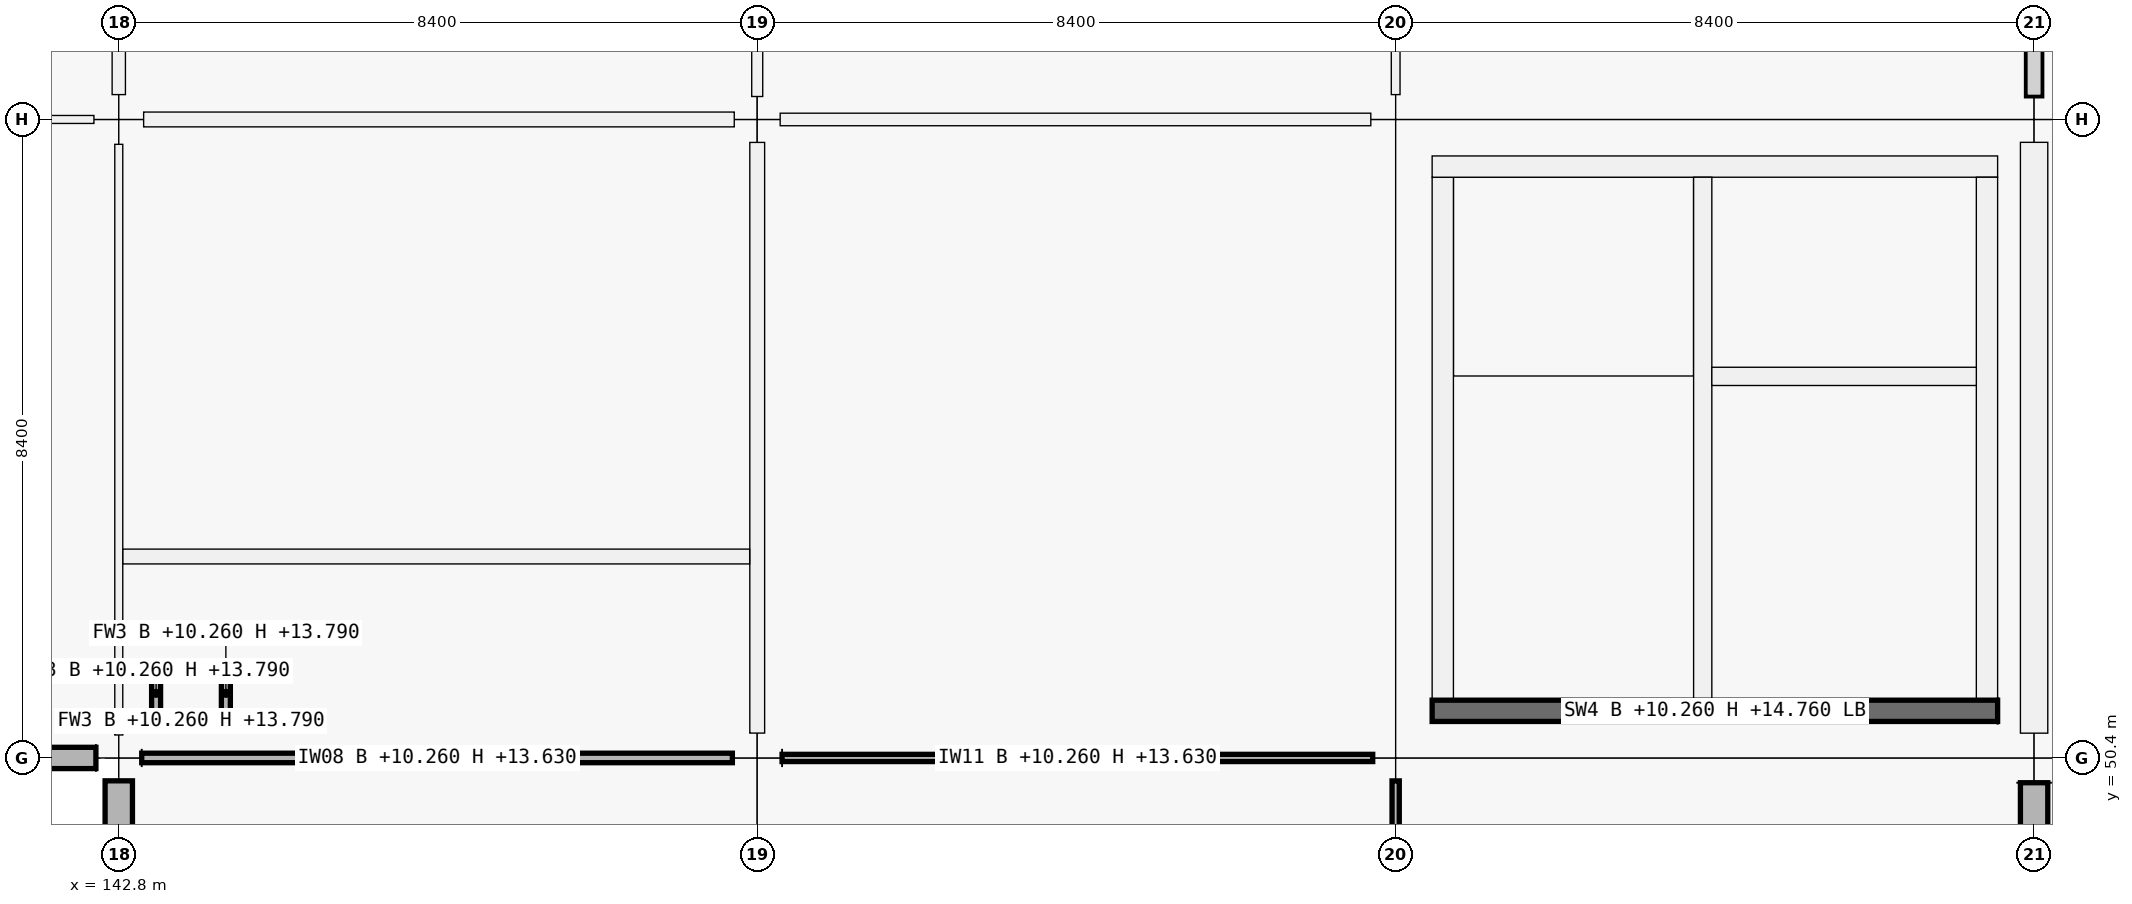
"""IFC4 building model, lengths in metres.
Left out: names, types, materials, properties, quantities, classifications, styles, units other than length and angle.
Written with IfcOpenShell. Run it as: python <this file> out.ifc"""

import sys

from ifc_helpers import new_model, si_unit, direction, frame, frame_2d, origin, origin_2d, place, context, subcontext, project, spatial, rectangle, extrude, element, fill, save


model = new_model("IFC4")
c1 = context("Model", 3, precision=1e-05, world=origin(), true_north=direction((0.0, 1.0)))
c2 = subcontext(c1, "Body", "Model", "MODEL_VIEW")
j1 = project(units=[si_unit("LENGTHUNIT", "METRE"), si_unit("PLANEANGLEUNIT", "RADIAN")], contexts=[c1])
p1 = place(None, origin())
s1 = spatial("IfcSite", under=j1, at=p1, CompositionType="ELEMENT")
p2 = place(p1, origin())
s2 = spatial("IfcBuilding", under=s1, at=p2, CompositionType="ELEMENT")
p3 = place(p2, frame((0.0, 0.0, 10.26)))
s3 = spatial("IfcBuildingStorey", under=s2, at=p3, CompositionType="ELEMENT", Elevation=10.26)
p4 = place(p3, frame((142.8, 50.4, 0.0), z_axis=(0.0, 0.0, 1.0), x_axis=(1.0, 0.0, 0.0)))
e1 = element("IfcColumn", 1, at=p4, inside=s3, PredefinedType="COLUMN", context=c2, shape_type="SweptSolid", body=[
    extrude(rectangle(XDim=0.6, YDim=0.6, at=origin_2d()), origin(), (0.0, 0.0, 1.0), 4.5),
])
for number, where, z_axis, x_axis in (
    (2, (142.8, 58.8, 0.0), (0.0, 0.0, 1.0), (1.0, 0.0, 0.0)),
    (3, (151.2, 50.4, 0.0), (0.0, 0.0, 1.0), (1.0, 0.0, 0.0)),
):
    element("IfcColumn", number, at=place(p3, frame(where, z_axis=z_axis, x_axis=x_axis)), inside=s3, PredefinedType="COLUMN", context=c2, shape_type="SweptSolid", body=[
        extrude(rectangle(XDim=0.65, YDim=0.65, at=origin_2d()), origin(), (0.0, 0.0, 1.0), 4.5),
    ])
for number, where, z_axis, x_axis in (
    (4, (151.2, 58.8, 0.0), (0.0, 0.0, 1.0), (1.0, 0.0, 0.0)),
    (5, (159.6, 50.4, 0.0), (0.0, 0.0, 1.0), (1.0, 0.0, 0.0)),
):
    element("IfcColumn", number, at=place(p3, frame(where, z_axis=z_axis, x_axis=x_axis)), inside=s3, PredefinedType="COLUMN", context=c2, shape_type="SweptSolid", body=[
        extrude(rectangle(XDim=0.6, YDim=0.6, at=origin_2d()), origin(), (0.0, 0.0, 1.0), 4.5),
    ])
for number, where, z_axis, x_axis in (
    (6, (159.6, 58.8, 0.0), (0.0, 0.0, 1.0), (1.0, 0.0, 0.0)),
    (7, (168.0, 50.4, 0.0), (0.0, 0.0, 1.0), (1.0, 0.0, 0.0)),
):
    element("IfcColumn", number, at=place(p3, frame(where, z_axis=z_axis, x_axis=x_axis)), inside=s3, PredefinedType="COLUMN", context=c2, shape_type="SweptSolid", body=[
        extrude(rectangle(XDim=0.65, YDim=0.65, at=origin_2d()), origin(), (0.0, 0.0, 1.0), 4.5),
    ])
p5 = place(p3, frame((168.0, 58.8, 0.0), z_axis=(0.0, 0.0, 1.0), x_axis=(1.0, 0.0, 0.0)))
e8 = element("IfcColumn", 8, at=p5, inside=s3, PredefinedType="COLUMN", context=c2, shape_type="SweptSolid", body=[
    extrude(rectangle(XDim=0.6, YDim=0.6, at=origin_2d()), origin(), (0.0, 0.0, 1.0), 4.5),
])
p6 = place(p3, frame((142.499, 50.4, 0.0), z_axis=(0.0, 0.0, 1.0), x_axis=(-1.0, 0.0, 0.0)))
e9 = element("IfcWall", 9, at=p6, inside=s3, PredefinedType="SOLIDWALL", context=c2, shape_type="SweptSolid", body=[
    extrude(rectangle(XDim=7.773, YDim=0.28, at=frame_2d((3.886, 0.0))), origin(), (0.0, 0.0, 1.0), 3.54),
])
p7 = place(p6, frame((2.911, 0.0, 0.9)))
e10 = element("IfcOpeningElement", 10, at=p7, cuts=e9, PredefinedType="OPENING", context=c2, shape_type="SweptSolid", body=[
    extrude(rectangle(XDim=1.95, YDim=1.6, at=frame_2d((0.975, 0.8))), frame((0.0, 0.14, 0.0), z_axis=(0.0, -1.0, 0.0), x_axis=(1.0, 0.0, 0.0)), (0.0, 0.0, 1.0), 0.28),
])
p8 = place(p3, frame((142.8, 42.326, 0.0), z_axis=(0.0, 0.0, 1.0), x_axis=(0.0, 1.0, 0.0)))
e11 = element("IfcWall", 11, at=p8, inside=s3, PredefinedType="SOLIDWALL", context=c2, shape_type="SweptSolid", body=[
    extrude(rectangle(XDim=7.773, YDim=0.36, at=frame_2d((3.887, 0.0))), origin(), (0.0, 0.0, 1.0), 3.54),
])
p9 = place(p8, frame((2.837, 0.0, 0.9)))
e12 = element("IfcOpeningElement", 12, at=p9, cuts=e11, PredefinedType="OPENING", context=c2, shape_type="SweptSolid", body=[
    extrude(rectangle(XDim=2.1, YDim=1.8, at=frame_2d((1.05, 0.9))), frame((0.0, 0.18, 0.0), z_axis=(0.0, -1.0, 0.0), x_axis=(1.0, 0.0, 0.0)), (0.0, 0.0, 1.0), 0.36),
])
p10 = place(p3, frame((168.0, 50.074, 0.0), z_axis=(0.0, 0.0, 1.0), x_axis=(0.0, -1.0, 0.0)))
e13 = element("IfcWall", 13, at=p10, inside=s3, PredefinedType="SOLIDWALL", context=c2, shape_type="SweptSolid", body=[
    extrude(rectangle(XDim=7.773, YDim=0.36, at=frame_2d((3.886, 0.0))), origin(), (0.0, 0.0, 1.0), 3.54),
])
p11 = place(p10, frame((2.587, 0.0, 0.9)))
e14 = element("IfcOpeningElement", 14, at=p11, cuts=e13, PredefinedType="OPENING", context=c2, shape_type="SweptSolid", body=[
    extrude(rectangle(XDim=2.6, YDim=2.1, at=frame_2d((1.3, 1.05))), frame((0.0, 0.18, 0.0), z_axis=(0.0, -1.0, 0.0), x_axis=(1.0, 0.0, 0.0)), (0.0, 0.0, 1.0), 0.36),
])
p12 = place(p3, frame((168.0, 58.499, 0.0), z_axis=(0.0, 0.0, 1.0), x_axis=(0.0, -1.0, 0.0)))
e15 = element("IfcWall", 15, at=p12, inside=s3, PredefinedType="SOLIDWALL", context=c2, shape_type="SweptSolid", body=[
    extrude(rectangle(XDim=7.773, YDim=0.36, at=frame_2d((3.886, 0.0))), origin(), (0.0, 0.0, 1.0), 3.54),
])
p13 = place(p3, frame((167.52, 51.02, 0.0), z_axis=(0.0, 0.0, 1.0), x_axis=(-1.0, 0.0, 0.0)))
e16 = element("IfcWall", 16, at=p13, inside=s3, PredefinedType="SHEAR", context=c2, shape_type="SweptSolid", body=[
    extrude(rectangle(XDim=7.44, YDim=0.28, at=frame_2d((3.72, 0.0))), origin(), (0.0, 0.0, 1.0), 4.5),
])
p14 = place(p13, frame((1.28, 0.0, 0.0)))
e17 = element("IfcOpeningElement", 17, at=p14, cuts=e16, PredefinedType="OPENING", context=c2, shape_type="SweptSolid", body=[
    extrude(rectangle(XDim=1.5, YDim=2.15, at=frame_2d((0.75, 1.075))), frame((0.0, 0.14, 0.0), z_axis=(0.0, -1.0, 0.0), x_axis=(1.0, 0.0, 0.0)), (0.0, 0.0, 1.0), 0.28),
])
p15 = place(p3, frame((160.22, 51.16, 0.0), z_axis=(0.0, 0.0, 1.0), x_axis=(0.0, 1.0, 0.0)))
e18 = element("IfcWall", 18, at=p15, inside=s3, PredefinedType="SHEAR", context=c2, shape_type="SweptSolid", body=[
    extrude(rectangle(XDim=6.88, YDim=0.28, at=frame_2d((3.44, 0.0))), origin(), (0.0, 0.0, 1.0), 4.5),
])
p16 = place(p3, frame((160.08, 58.18, 0.0), z_axis=(0.0, 0.0, 1.0), x_axis=(1.0, 0.0, 0.0)))
e19 = element("IfcWall", 19, at=p16, inside=s3, PredefinedType="SHEAR", context=c2, shape_type="SweptSolid", body=[
    extrude(rectangle(XDim=7.44, YDim=0.28, at=frame_2d((3.72, 0.0))), origin(), (0.0, 0.0, 1.0), 4.5),
])
p17 = place(p3, frame((167.38, 58.04, 0.0), z_axis=(0.0, 0.0, 1.0), x_axis=(0.0, -1.0, 0.0)))
e20 = element("IfcWall", 20, at=p17, inside=s3, PredefinedType="SHEAR", context=c2, shape_type="SweptSolid", body=[
    extrude(rectangle(XDim=6.88, YDim=0.28, at=frame_2d((3.44, 0.0))), origin(), (0.0, 0.0, 1.0), 4.5),
])
p18 = place(p3, frame((163.64, 51.16, 0.0), z_axis=(0.0, 0.0, 1.0), x_axis=(0.0, 1.0, 0.0)))
e21 = element("IfcWall", 21, at=p18, inside=s3, PredefinedType="SHEAR", context=c2, shape_type="SweptSolid", body=[
    extrude(rectangle(XDim=6.88, YDim=0.24, at=frame_2d((3.44, 0.0))), origin(), (0.0, 0.0, 1.0), 4.5),
])
p19 = place(p18, frame((0.12, 0.0, 0.0)))
e22 = element("IfcOpeningElement", 22, at=p19, cuts=e21, PredefinedType="OPENING", context=c2, shape_type="SweptSolid", body=[
    extrude(rectangle(XDim=1.0, YDim=2.15, at=frame_2d((0.5, 1.075))), frame((0.0, 0.12, 0.0), z_axis=(0.0, -1.0, 0.0), x_axis=(1.0, 0.0, 0.0)), (0.0, 0.0, 1.0), 0.24),
])
p20 = place(p3, frame((163.76, 55.42, 0.0), z_axis=(0.0, 0.0, 1.0), x_axis=(1.0, 0.0, 0.0)))
e23 = element("IfcWall", 23, at=p20, inside=s3, PredefinedType="SHEAR", context=c2, shape_type="SweptSolid", body=[
    extrude(rectangle(XDim=3.48, YDim=0.24, at=frame_2d((1.74, 0.0))), origin(), (0.0, 0.0, 1.0), 4.5),
])
p21 = place(p20, frame((1.09, 0.0, 0.0)))
e24 = element("IfcOpeningElement", 24, at=p21, cuts=e23, PredefinedType="OPENING", context=c2, shape_type="SweptSolid", body=[
    extrude(rectangle(XDim=1.3, YDim=2.25, at=frame_2d((0.65, 1.125))), frame((0.0, 0.12, 0.0), z_axis=(0.0, -1.0, 0.0), x_axis=(1.0, 0.0, 0.0)), (0.0, 0.0, 1.0), 0.24),
])
for number, where, z_axis, x_axis in (
    (25, (143.232, 50.891, 0.0), (0.0, 0.0, 1.0), (1.0, 0.0, 0.0)),
    (26, (143.232, 51.609, 0.0), (0.0, 0.0, 1.0), (1.0, 0.0, 0.0)),
):
    element("IfcWall", number, at=place(p3, frame(where, z_axis=z_axis, x_axis=x_axis)), inside=s3, PredefinedType="PARTITIONING", context=c2, shape_type="SweptSolid", body=[
        extrude(rectangle(XDim=1.036, YDim=0.118, at=frame_2d((0.518, 0.0))), origin(), (0.0, 0.0, 1.0), 3.53),
    ])
for number, where, z_axis, x_axis in (
    (27, (143.291, 50.95, 0.0), (0.0, 0.0, 1.0), (0.0, 1.0, 0.0)),
    (28, (144.209, 50.95, 0.0), (0.0, 0.0, 1.0), (0.0, 1.0, 0.0)),
):
    element("IfcWall", number, at=place(p3, frame(where, z_axis=z_axis, x_axis=x_axis)), inside=s3, PredefinedType="PARTITIONING", context=c2, shape_type="SweptSolid", body=[
        extrude(rectangle(XDim=0.6, YDim=0.118, at=frame_2d((0.3, 0.0))), origin(), (0.0, 0.0, 1.0), 3.53),
    ])
p22 = place(p3, frame((134.702, 58.8, 0.0), z_axis=(0.0, 0.0, 1.0), x_axis=(1.0, 0.0, 0.0)))
e29 = element("IfcWall", 29, at=p22, inside=s3, PredefinedType="PARTITIONING", context=c2, shape_type="SweptSolid", body=[
    extrude(rectangle(XDim=7.771, YDim=0.105, at=frame_2d((3.885, 0.0))), origin(), (0.0, 0.0, 1.0), 3.37),
])
p23 = place(p22, frame((3.415, 0.0, 0.0)))
e30 = element("IfcOpeningElement", 30, at=p23, cuts=e29, PredefinedType="OPENING", context=c2, shape_type="SweptSolid", body=[
    extrude(rectangle(XDim=0.94, YDim=2.15, at=frame_2d((0.47, 1.075))), frame((0.0, 0.052, 0.0), z_axis=(0.0, -1.0, 0.0), x_axis=(1.0, 0.0, 0.0)), (0.0, 0.0, 1.0), 0.105),
])
p24 = place(p3, frame((143.102, 50.4, 0.0), z_axis=(0.0, 0.0, 1.0), x_axis=(1.0, 0.0, 0.0)))
e31 = element("IfcWall", 31, at=p24, inside=s3, PredefinedType="PARTITIONING", context=c2, shape_type="SweptSolid", body=[
    extrude(rectangle(XDim=7.771, YDim=0.125, at=frame_2d((3.885, 0.0))), origin(), (0.0, 0.0, 1.0), 3.37),
])
p25 = place(p3, frame((143.127, 58.8, 0.0), z_axis=(0.0, 0.0, 1.0), x_axis=(1.0, 0.0, 0.0)))
e32 = element("IfcWall", 32, at=p25, inside=s3, PredefinedType="PARTITIONING", context=c2, shape_type="SweptSolid", body=[
    extrude(rectangle(XDim=7.771, YDim=0.195, at=frame_2d((3.885, 0.0))), origin(), (0.0, 0.0, 1.0), 3.37),
])
p26 = place(p3, frame((151.527, 50.4, 0.0), z_axis=(0.0, 0.0, 1.0), x_axis=(1.0, 0.0, 0.0)))
e33 = element("IfcWall", 33, at=p26, inside=s3, PredefinedType="PARTITIONING", context=c2, shape_type="SweptSolid", body=[
    extrude(rectangle(XDim=7.771, YDim=0.095, at=frame_2d((3.885, 0.0))), origin(), (0.0, 0.0, 1.0), 3.37),
])
p27 = place(p26, frame((3.405, 0.0, 0.0)))
e34 = element("IfcOpeningElement", 34, at=p27, cuts=e33, PredefinedType="OPENING", context=c2, shape_type="SweptSolid", body=[
    extrude(rectangle(XDim=0.96, YDim=2.18, at=frame_2d((0.48, 1.09))), frame((0.0, 0.047, 0.0), z_axis=(0.0, -1.0, 0.0), x_axis=(1.0, 0.0, 0.0)), (0.0, 0.0, 1.0), 0.095),
])
p28 = place(p3, frame((151.502, 58.8, 0.0), z_axis=(0.0, 0.0, 1.0), x_axis=(1.0, 0.0, 0.0)))
e35 = element("IfcWall", 35, at=p28, inside=s3, PredefinedType="PARTITIONING", context=c2, shape_type="SweptSolid", body=[
    extrude(rectangle(XDim=7.771, YDim=0.165, at=frame_2d((3.885, 0.0))), origin(), (0.0, 0.0, 1.0), 3.37),
])
p29 = place(p28, frame((3.415, 0.0, 0.0)))
e36 = element("IfcOpeningElement", 36, at=p29, cuts=e35, PredefinedType="OPENING", context=c2, shape_type="SweptSolid", body=[
    extrude(rectangle(XDim=0.94, YDim=2.15, at=frame_2d((0.47, 1.075))), frame((0.0, 0.083, 0.0), z_axis=(0.0, -1.0, 0.0), x_axis=(1.0, 0.0, 0.0)), (0.0, 0.0, 1.0), 0.165),
])
p30 = place(p3, frame((142.8, 50.702, 0.0), z_axis=(0.0, 0.0, 1.0), x_axis=(0.0, 1.0, 0.0)))
e37 = element("IfcWall", 37, at=p30, inside=s3, PredefinedType="PARTITIONING", context=c2, shape_type="SweptSolid", body=[
    extrude(rectangle(XDim=7.771, YDim=0.105, at=frame_2d((3.885, 0.0))), origin(), (0.0, 0.0, 1.0), 3.37),
])
p31 = place(p30, frame((0.673, 0.0, 0.0)))
e38 = element("IfcOpeningElement", 38, at=p31, cuts=e37, PredefinedType="OPENING", context=c2, shape_type="SweptSolid", body=[
    extrude(rectangle(XDim=0.98, YDim=2.08, at=frame_2d((0.49, 1.04))), frame((0.0, 0.052, 0.0), z_axis=(0.0, -1.0, 0.0), x_axis=(1.0, 0.0, 0.0)), (0.0, 0.0, 1.0), 0.105),
])
p32 = place(p30, frame((4.613, 0.0, 0.0)))
e39 = element("IfcOpeningElement", 39, at=p32, cuts=e37, PredefinedType="OPENING", context=c2, shape_type="SweptSolid", body=[
    extrude(rectangle(XDim=0.94, YDim=2.08, at=frame_2d((0.47, 1.04))), frame((0.0, 0.052, 0.0), z_axis=(0.0, -1.0, 0.0), x_axis=(1.0, 0.0, 0.0)), (0.0, 0.0, 1.0), 0.105),
])
p33 = place(p3, frame((142.8, 59.127, 0.0), z_axis=(0.0, 0.0, 1.0), x_axis=(0.0, 1.0, 0.0)))
e40 = element("IfcWall", 40, at=p33, inside=s3, PredefinedType="PARTITIONING", context=c2, shape_type="SweptSolid", body=[
    extrude(rectangle(XDim=7.771, YDim=0.175, at=frame_2d((3.885, 0.0))), origin(), (0.0, 0.0, 1.0), 3.37),
])
p34 = place(p33, frame((3.345, 0.0, 0.0)))
e41 = element("IfcOpeningElement", 41, at=p34, cuts=e40, PredefinedType="OPENING", context=c2, shape_type="SweptSolid", body=[
    extrude(rectangle(XDim=1.08, YDim=2.25, at=frame_2d((0.54, 1.125))), frame((0.0, 0.087, 0.0), z_axis=(0.0, -1.0, 0.0), x_axis=(1.0, 0.0, 0.0)), (0.0, 0.0, 1.0), 0.175),
])
p35 = place(p3, frame((151.2, 50.727, 0.0), z_axis=(0.0, 0.0, 1.0), x_axis=(0.0, 1.0, 0.0)))
e42 = element("IfcWall", 42, at=p35, inside=s3, PredefinedType="PARTITIONING", context=c2, shape_type="SweptSolid", body=[
    extrude(rectangle(XDim=7.771, YDim=0.195, at=frame_2d((3.885, 0.0))), origin(), (0.0, 0.0, 1.0), 3.37),
])
p36 = place(p3, frame((151.2, 59.102, 0.0), z_axis=(0.0, 0.0, 1.0), x_axis=(0.0, 1.0, 0.0)))
e43 = element("IfcWall", 43, at=p36, inside=s3, PredefinedType="PARTITIONING", context=c2, shape_type="SweptSolid", body=[
    extrude(rectangle(XDim=7.771, YDim=0.145, at=frame_2d((3.885, 0.0))), origin(), (0.0, 0.0, 1.0), 3.37),
])
p37 = place(p36, frame((3.401, 0.0, 0.0)))
e44 = element("IfcOpeningElement", 44, at=p37, cuts=e43, PredefinedType="OPENING", context=c2, shape_type="SweptSolid", body=[
    extrude(rectangle(XDim=0.97, YDim=2.12, at=frame_2d((0.485, 1.06))), frame((0.0, 0.073, 0.0), z_axis=(0.0, -1.0, 0.0), x_axis=(1.0, 0.0, 0.0)), (0.0, 0.0, 1.0), 0.145),
])
p38 = place(p3, frame((159.6, 42.327, 0.0), z_axis=(0.0, 0.0, 1.0), x_axis=(0.0, 1.0, 0.0)))
e45 = element("IfcWall", 45, at=p38, inside=s3, PredefinedType="PARTITIONING", context=c2, shape_type="SweptSolid", body=[
    extrude(rectangle(XDim=7.771, YDim=0.095, at=frame_2d((3.885, 0.0))), origin(), (0.0, 0.0, 1.0), 3.37),
])
p39 = place(p38, frame((3.381, 0.0, 0.0)))
e46 = element("IfcOpeningElement", 46, at=p39, cuts=e45, PredefinedType="OPENING", context=c2, shape_type="SweptSolid", body=[
    extrude(rectangle(XDim=1.01, YDim=2.12, at=frame_2d((0.505, 1.06))), frame((0.0, 0.047, 0.0), z_axis=(0.0, -1.0, 0.0), x_axis=(1.0, 0.0, 0.0)), (0.0, 0.0, 1.0), 0.095),
])
p40 = place(p3, frame((159.6, 59.127, 0.0), z_axis=(0.0, 0.0, 1.0), x_axis=(0.0, 1.0, 0.0)))
e47 = element("IfcWall", 47, at=p40, inside=s3, PredefinedType="PARTITIONING", context=c2, shape_type="SweptSolid", body=[
    extrude(rectangle(XDim=7.771, YDim=0.115, at=frame_2d((3.885, 0.0))), origin(), (0.0, 0.0, 1.0), 3.37),
])
p41 = place(p40, frame((3.365, 0.0, 0.0)))
e48 = element("IfcOpeningElement", 48, at=p41, cuts=e47, PredefinedType="OPENING", context=c2, shape_type="SweptSolid", body=[
    extrude(rectangle(XDim=1.04, YDim=2.2, at=frame_2d((0.52, 1.1))), frame((0.0, 0.058, 0.0), z_axis=(0.0, -1.0, 0.0), x_axis=(1.0, 0.0, 0.0)), (0.0, 0.0, 1.0), 0.115),
])
p42 = place(p3, frame((142.854, 53.05, 0.0), z_axis=(0.0, 0.0, 1.0), x_axis=(1.0, 0.0, 0.0)))
e49 = element("IfcWall", 49, at=p42, inside=s3, PredefinedType="PARTITIONING", context=c2, shape_type="SweptSolid", body=[
    extrude(rectangle(XDim=8.246, YDim=0.195, at=frame_2d((4.123, 0.0))), origin(), (0.0, 0.0, 1.0), 3.37),
])
p43 = place(p19, origin())
e50 = element("IfcDoor", 50, at=p43, inside=s3, OperationType="SINGLE_SWING_LEFT", PredefinedType="DOOR", context=c2, shape_type="SweptSolid", body=[
    extrude(rectangle(XDim=1.0, YDim=2.15, at=frame_2d((0.5, 1.075))), frame((0.0, 0.025, 0.0), z_axis=(0.0, -1.0, 0.0), x_axis=(1.0, 0.0, 0.0)), (0.0, 0.0, 1.0), 0.05),
])
fill(e22, e50)
p44 = place(p14, origin())
e51 = element("IfcDoor", 51, at=p44, inside=s3, OperationType="DOUBLE_DOOR_SINGLE_SWING", PredefinedType="DOOR", context=c2, shape_type="SweptSolid", body=[
    extrude(rectangle(XDim=1.5, YDim=2.15, at=frame_2d((0.75, 1.075))), frame((0.0, 0.025, 0.0), z_axis=(0.0, -1.0, 0.0), x_axis=(1.0, 0.0, 0.0)), (0.0, 0.0, 1.0), 0.05),
])
fill(e17, e51)
p45 = place(p21, origin())
e52 = element("IfcDoor", 52, at=p45, inside=s3, OperationType="DOUBLE_DOOR_SLIDING", PredefinedType="DOOR", context=c2, shape_type="SweptSolid", body=[
    extrude(rectangle(XDim=1.3, YDim=2.25, at=frame_2d((0.65, 1.125))), frame((0.0, 0.025, 0.0), z_axis=(0.0, -1.0, 0.0), x_axis=(1.0, 0.0, 0.0)), (0.0, 0.0, 1.0), 0.05),
])
fill(e24, e52)
p46 = place(p31, origin())
e53 = element("IfcDoor", 53, at=p46, inside=s3, OperationType="SINGLE_SWING_RIGHT", PredefinedType="DOOR", context=c2, shape_type="SweptSolid", body=[
    extrude(rectangle(XDim=0.98, YDim=2.08, at=frame_2d((0.49, 1.04))), frame((0.0, 0.025, 0.0), z_axis=(0.0, -1.0, 0.0), x_axis=(1.0, 0.0, 0.0)), (0.0, 0.0, 1.0), 0.05),
])
fill(e38, e53)
p47 = place(p32, origin())
e54 = element("IfcDoor", 54, at=p47, inside=s3, OperationType="SINGLE_SWING_LEFT", PredefinedType="DOOR", context=c2, shape_type="SweptSolid", body=[
    extrude(rectangle(XDim=0.94, YDim=2.08, at=frame_2d((0.47, 1.04))), frame((0.0, 0.025, 0.0), z_axis=(0.0, -1.0, 0.0), x_axis=(1.0, 0.0, 0.0)), (0.0, 0.0, 1.0), 0.05),
])
fill(e39, e54)
p48 = place(p27, origin())
e55 = element("IfcDoor", 55, at=p48, inside=s3, OperationType="SINGLE_SWING_RIGHT", PredefinedType="DOOR", context=c2, shape_type="SweptSolid", body=[
    extrude(rectangle(XDim=0.96, YDim=2.18, at=frame_2d((0.48, 1.09))), frame((0.0, 0.025, 0.0), z_axis=(0.0, -1.0, 0.0), x_axis=(1.0, 0.0, 0.0)), (0.0, 0.0, 1.0), 0.05),
])
fill(e34, e55)
p49 = place(p29, origin())
e56 = element("IfcDoor", 56, at=p49, inside=s3, OperationType="SINGLE_SWING_LEFT", PredefinedType="DOOR", context=c2, shape_type="SweptSolid", body=[
    extrude(rectangle(XDim=0.94, YDim=2.15, at=frame_2d((0.47, 1.075))), frame((0.0, 0.025, 0.0), z_axis=(0.0, -1.0, 0.0), x_axis=(1.0, 0.0, 0.0)), (0.0, 0.0, 1.0), 0.05),
])
fill(e36, e56)
save(model, sys.argv[1])
